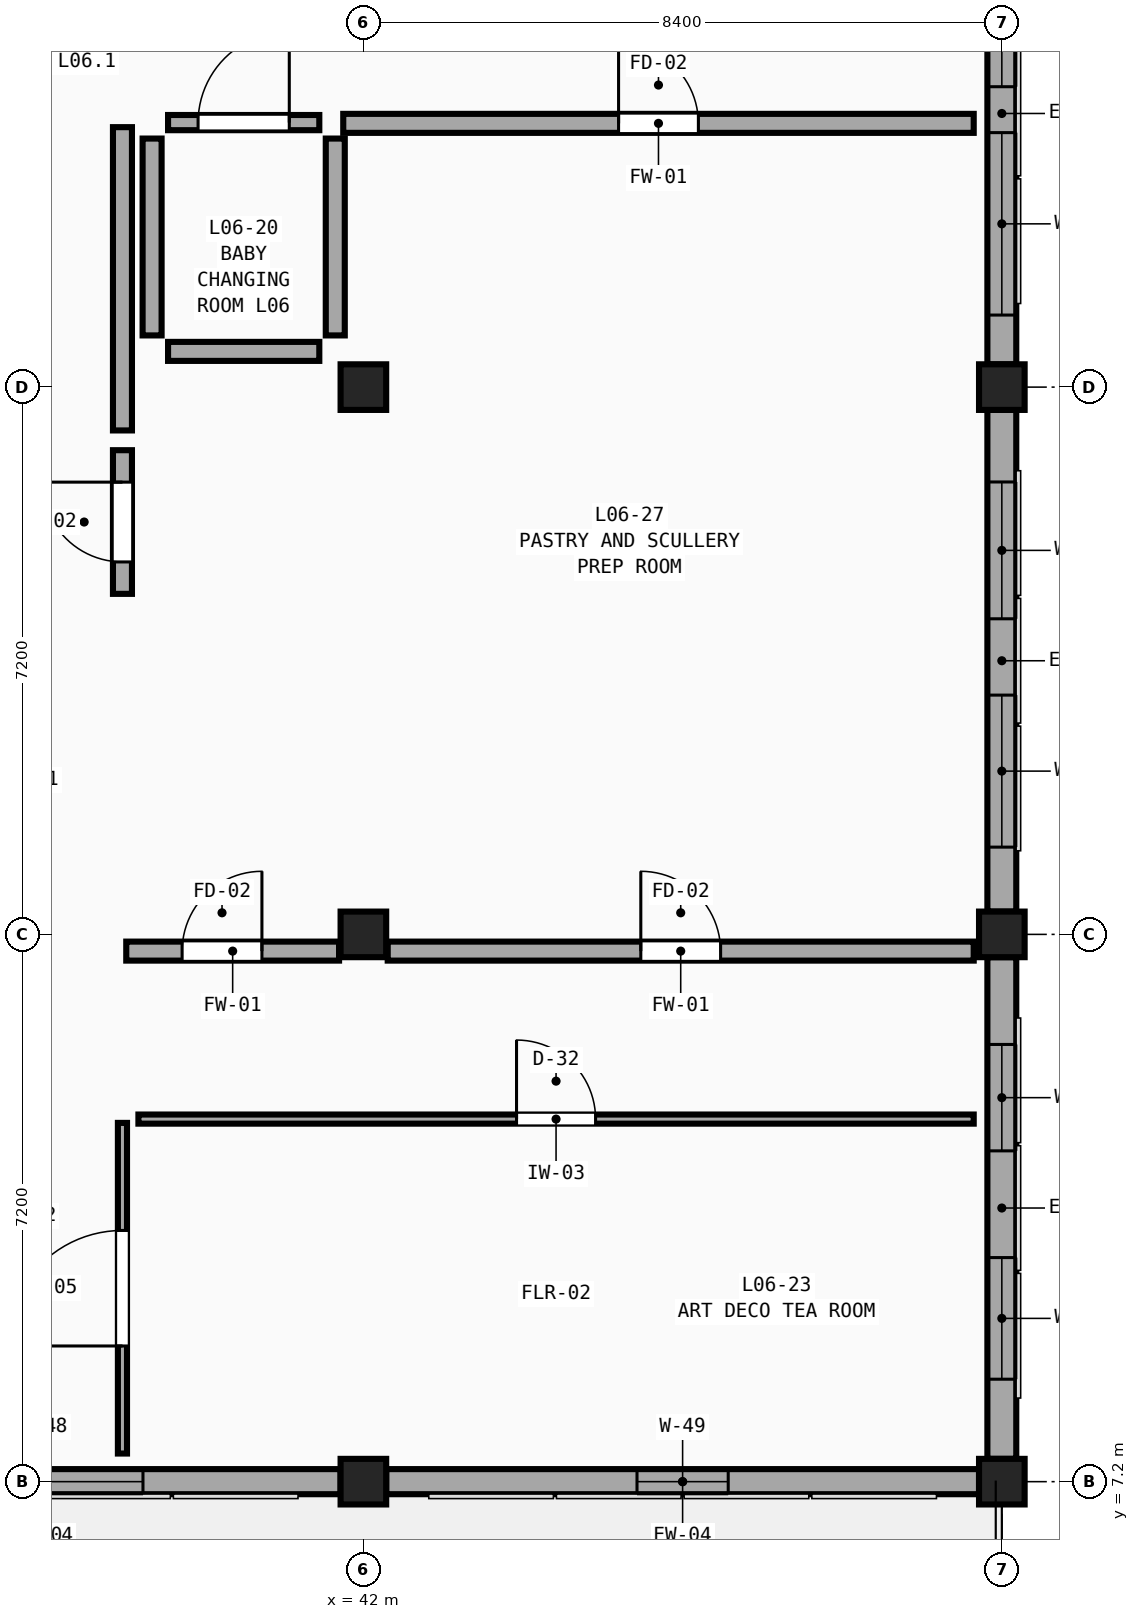
"""IFC4 building model, lengths in metres.
Left out: names, types, materials, properties, quantities, classifications, styles, units other than length and angle.
Written with IfcOpenShell. Run it as: python <this file> out.ifc"""

import sys

from ifc_helpers import new_model, si_unit, direction, frame, frame_2d, origin, origin_2d, place, context, subcontext, project, spatial, rectangle, extrude, element, fill, save


model = new_model("IFC4")
c1 = context("Model", 3, precision=1e-05, world=origin(), true_north=direction((0.0, 1.0)))
c2 = subcontext(c1, "Body", "Model", "MODEL_VIEW")
j1 = project(units=[si_unit("LENGTHUNIT", "METRE"), si_unit("PLANEANGLEUNIT", "RADIAN")], contexts=[c1])
p1 = place(None, origin())
s1 = spatial("IfcSite", under=j1, at=p1, CompositionType="ELEMENT")
p2 = place(p1, origin())
s2 = spatial("IfcBuilding", under=s1, at=p2, CompositionType="ELEMENT")
p3 = place(p2, frame((0.0, 0.0, 27.9)))
s3 = spatial("IfcBuildingStorey", under=s2, at=p3, CompositionType="ELEMENT", Elevation=27.9)
for number, where, z_axis, x_axis in (
    (1, (42.0, 7.2, 0.0), (0.0, 0.0, 1.0), (1.0, 0.0, 0.0)),
    (2, (42.0, 14.4, 0.0), (0.0, 0.0, 1.0), (1.0, 0.0, 0.0)),
    (3, (42.0, 21.6, 0.0), (0.0, 0.0, 1.0), (1.0, 0.0, 0.0)),
    (4, (50.4, 7.2, 0.0), (0.0, 0.0, 1.0), (1.0, 0.0, 0.0)),
    (5, (50.4, 14.4, 0.0), (0.0, 0.0, 1.0), (1.0, 0.0, 0.0)),
    (6, (50.4, 21.6, 0.0), (0.0, 0.0, 1.0), (1.0, 0.0, 0.0)),
):
    element("IfcColumn", number, at=place(p3, frame(where, z_axis=z_axis, x_axis=x_axis)), inside=s3, PredefinedType="COLUMN", context=c2, shape_type="SweptSolid", body=[
        extrude(rectangle(XDim=0.6, YDim=0.6, at=origin_2d()), origin(), (0.0, 0.0, 1.0), 4.2),
    ])
p4 = place(p3, frame((41.7, 7.2, 0.0), z_axis=(0.0, 0.0, 1.0), x_axis=(-1.0, 0.0, 0.0)))
e7 = element("IfcWall", 7, at=p4, inside=s3, PredefinedType="SOLIDWALL", context=c2, shape_type="SweptSolid", body=[
    extrude(rectangle(XDim=7.8, YDim=0.33, at=frame_2d((3.9, 0.0))), origin(), (0.0, 0.0, 1.0), 3.36),
])
p5 = place(p4, frame((2.6, 0.0, 0.75)))
e8 = element("IfcOpeningElement", 8, at=p5, cuts=e7, PredefinedType="OPENING", context=c2, shape_type="SweptSolid", body=[
    extrude(rectangle(XDim=2.6, YDim=2.41, at=frame_2d((1.3, 1.205))), frame((0.0, 0.185, 0.0), z_axis=(0.0, -1.0, 0.0), x_axis=(1.0, 0.0, 0.0)), (0.0, 0.0, 1.0), 0.37),
])
p6 = place(p3, frame((50.1, 7.2, 0.0), z_axis=(0.0, 0.0, 1.0), x_axis=(-1.0, 0.0, 0.0)))
e9 = element("IfcWall", 9, at=p6, inside=s3, PredefinedType="SOLIDWALL", context=c2, shape_type="SweptSolid", body=[
    extrude(rectangle(XDim=7.8, YDim=0.33, at=frame_2d((3.9, 0.0))), origin(), (0.0, 0.0, 1.0), 3.36),
])
p7 = place(p6, frame((3.3, 0.0, 0.75)))
e10 = element("IfcOpeningElement", 10, at=p7, cuts=e9, PredefinedType="OPENING", context=c2, shape_type="SweptSolid", body=[
    extrude(rectangle(XDim=1.2, YDim=2.41, at=frame_2d((0.6, 1.205))), frame((0.0, 0.185, 0.0), z_axis=(0.0, -1.0, 0.0), x_axis=(1.0, 0.0, 0.0)), (0.0, 0.0, 1.0), 0.37),
])
p8 = place(p3, frame((50.4, 14.1, 0.0), z_axis=(0.0, 0.0, 1.0), x_axis=(0.0, -1.0, 0.0)))
e11 = element("IfcWall", 11, at=p8, inside=s3, PredefinedType="SOLIDWALL", context=c2, shape_type="SweptSolid", body=[
    extrude(rectangle(XDim=6.6, YDim=0.38, at=frame_2d((3.3, 0.0))), origin(), (0.0, 0.0, 1.0), 3.36),
])
p9 = place(p8, frame((1.148, 0.0, 0.75)))
e12 = element("IfcOpeningElement", 12, at=p9, cuts=e11, PredefinedType="OPENING", context=c2, shape_type="SweptSolid", body=[
    extrude(rectangle(XDim=1.4, YDim=2.46, at=frame_2d((0.7, 1.23))), frame((0.0, 0.21, 0.0), z_axis=(0.0, -1.0, 0.0), x_axis=(1.0, 0.0, 0.0)), (0.0, 0.0, 1.0), 0.42),
])
p10 = place(p8, frame((3.952, 0.0, 0.75)))
e13 = element("IfcOpeningElement", 13, at=p10, cuts=e11, PredefinedType="OPENING", context=c2, shape_type="SweptSolid", body=[
    extrude(rectangle(XDim=1.6, YDim=2.46, at=frame_2d((0.8, 1.23))), frame((0.0, 0.21, 0.0), z_axis=(0.0, -1.0, 0.0), x_axis=(1.0, 0.0, 0.0)), (0.0, 0.0, 1.0), 0.42),
])
p11 = place(p3, frame((50.4, 21.3, 0.0), z_axis=(0.0, 0.0, 1.0), x_axis=(0.0, -1.0, 0.0)))
e14 = element("IfcWall", 14, at=p11, inside=s3, PredefinedType="SOLIDWALL", context=c2, shape_type="SweptSolid", body=[
    extrude(rectangle(XDim=6.6, YDim=0.38, at=frame_2d((3.3, 0.0))), origin(), (0.0, 0.0, 1.0), 3.36),
])
p12 = place(p11, frame((0.948, 0.0, 0.75)))
e15 = element("IfcOpeningElement", 15, at=p12, cuts=e14, PredefinedType="OPENING", context=c2, shape_type="SweptSolid", body=[
    extrude(rectangle(XDim=1.8, YDim=2.46, at=frame_2d((0.9, 1.23))), frame((0.0, 0.21, 0.0), z_axis=(0.0, -1.0, 0.0), x_axis=(1.0, 0.0, 0.0)), (0.0, 0.0, 1.0), 0.42),
])
p13 = place(p11, frame((3.752, 0.0, 0.75)))
e16 = element("IfcOpeningElement", 16, at=p13, cuts=e14, PredefinedType="OPENING", context=c2, shape_type="SweptSolid", body=[
    extrude(rectangle(XDim=2.0, YDim=2.46, at=frame_2d((1.0, 1.23))), frame((0.0, 0.21, 0.0), z_axis=(0.0, -1.0, 0.0), x_axis=(1.0, 0.0, 0.0)), (0.0, 0.0, 1.0), 0.42),
])
p14 = place(p3, frame((50.4, 28.5, 0.0), z_axis=(0.0, 0.0, 1.0), x_axis=(0.0, -1.0, 0.0)))
e17 = element("IfcWall", 17, at=p14, inside=s3, PredefinedType="SOLIDWALL", context=c2, shape_type="SweptSolid", body=[
    extrude(rectangle(XDim=6.6, YDim=0.38, at=frame_2d((3.3, 0.0))), origin(), (0.0, 0.0, 1.0), 3.36),
])
p15 = place(p14, frame((0.748, 0.0, 0.75)))
e18 = element("IfcOpeningElement", 18, at=p15, cuts=e17, PredefinedType="OPENING", context=c2, shape_type="SweptSolid", body=[
    extrude(rectangle(XDim=2.2, YDim=2.46, at=frame_2d((1.1, 1.23))), frame((0.0, 0.21, 0.0), z_axis=(0.0, -1.0, 0.0), x_axis=(1.0, 0.0, 0.0)), (0.0, 0.0, 1.0), 0.42),
])
p16 = place(p14, frame((3.552, 0.0, 0.75)))
e19 = element("IfcOpeningElement", 19, at=p16, cuts=e17, PredefinedType="OPENING", context=c2, shape_type="SweptSolid", body=[
    extrude(rectangle(XDim=2.4, YDim=2.46, at=frame_2d((1.2, 1.23))), frame((0.0, 0.21, 0.0), z_axis=(0.0, -1.0, 0.0), x_axis=(1.0, 0.0, 0.0)), (0.0, 0.0, 1.0), 0.42),
])
p17 = place(p3, frame((38.88, 14.18, 0.0), z_axis=(0.0, 0.0, 1.0), x_axis=(1.0, 0.0, 0.0)))
e20 = element("IfcWall", 20, at=p17, inside=s3, PredefinedType="SOLIDWALL", context=c2, shape_type="SweptSolid", body=[
    extrude(rectangle(XDim=2.8, YDim=0.25, at=frame_2d((1.4, 0.0))), origin(), (0.0, 0.0, 1.0), 3.46),
])
p18 = place(p17, frame((0.735, 0.0, 0.0)))
e21 = element("IfcOpeningElement", 21, at=p18, cuts=e20, PredefinedType="OPENING", context=c2, shape_type="SweptSolid", body=[
    extrude(rectangle(XDim=1.05, YDim=2.15, at=frame_2d((0.525, 1.075))), frame((0.0, 0.145, 0.0), z_axis=(0.0, -1.0, 0.0), x_axis=(1.0, 0.0, 0.0)), (0.0, 0.0, 1.0), 0.29),
])
p19 = place(p3, frame((42.32, 14.18, 0.0), z_axis=(0.0, 0.0, 1.0), x_axis=(1.0, 0.0, 0.0)))
e22 = element("IfcWall", 22, at=p19, inside=s3, PredefinedType="SOLIDWALL", context=c2, shape_type="SweptSolid", body=[
    extrude(rectangle(XDim=7.71, YDim=0.25, at=frame_2d((3.855, 0.0))), origin(), (0.0, 0.0, 1.0), 3.46),
])
p20 = place(p19, frame((3.33, 0.0, 0.0)))
e23 = element("IfcOpeningElement", 23, at=p20, cuts=e22, PredefinedType="OPENING", context=c2, shape_type="SweptSolid", body=[
    extrude(rectangle(XDim=1.05, YDim=2.15, at=frame_2d((0.525, 1.075))), frame((0.0, 0.145, 0.0), z_axis=(0.0, -1.0, 0.0), x_axis=(1.0, 0.0, 0.0)), (0.0, 0.0, 1.0), 0.29),
])
p21 = place(p3, frame((39.04, 11.97, 0.0), z_axis=(0.0, 0.0, 1.0), x_axis=(1.0, 0.0, 0.0)))
e24 = element("IfcWall", 24, at=p21, inside=s3, PredefinedType="PARTITIONING", context=c2, shape_type="SweptSolid", body=[
    extrude(rectangle(XDim=10.99, YDim=0.12, at=frame_2d((5.495, 0.0))), origin(), (0.0, 0.0, 1.0), 3.91),
])
p22 = place(p21, frame((4.975, 0.0, 0.0)))
e25 = element("IfcOpeningElement", 25, at=p22, cuts=e24, PredefinedType="OPENING", context=c2, shape_type="SweptSolid", body=[
    extrude(rectangle(XDim=1.04, YDim=2.45, at=frame_2d((0.52, 1.225))), frame((0.0, 0.08, 0.0), z_axis=(0.0, -1.0, 0.0), x_axis=(1.0, 0.0, 0.0)), (0.0, 0.0, 1.0), 0.16),
])
p23 = place(p3, frame((41.735, 25.07, 0.0), z_axis=(0.0, 0.0, 1.0), x_axis=(1.0, 0.0, 0.0)))
e26 = element("IfcWall", 26, at=p23, inside=s3, PredefinedType="SOLIDWALL", context=c2, shape_type="SweptSolid", body=[
    extrude(rectangle(XDim=8.295, YDim=0.25, at=frame_2d((4.147, 0.0))), origin(), (0.0, 0.0, 1.0), 3.91),
])
p24 = place(p23, frame((3.623, 0.0, 0.0)))
e27 = element("IfcOpeningElement", 27, at=p24, cuts=e26, PredefinedType="OPENING", context=c2, shape_type="SweptSolid", body=[
    extrude(rectangle(XDim=1.05, YDim=2.15, at=frame_2d((0.525, 1.075))), frame((0.0, 0.145, 0.0), z_axis=(0.0, -1.0, 0.0), x_axis=(1.0, 0.0, 0.0)), (0.0, 0.0, 1.0), 0.29),
])
p25 = place(p3, frame((38.83, 7.57, 0.0), z_axis=(0.0, 0.0, 1.0), x_axis=(0.0, 1.0, 0.0)))
e28 = element("IfcWall", 28, at=p25, inside=s3, PredefinedType="PARTITIONING", context=c2, shape_type="SweptSolid", body=[
    extrude(rectangle(XDim=4.35, YDim=0.12, at=frame_2d((2.175, 0.0))), origin(), (0.0, 0.0, 1.0), 3.91),
])
p26 = place(p25, frame((1.415, 0.0, 0.0)))
e29 = element("IfcOpeningElement", 29, at=p26, cuts=e28, PredefinedType="OPENING", context=c2, shape_type="SweptSolid", body=[
    extrude(rectangle(XDim=1.52, YDim=2.05, at=frame_2d((0.76, 1.025))), frame((0.0, 0.08, 0.0), z_axis=(0.0, -1.0, 0.0), x_axis=(1.0, 0.0, 0.0)), (0.0, 0.0, 1.0), 0.16),
])
p27 = place(p3, frame((38.83, 21.03, 0.0), z_axis=(0.0, 0.0, 1.0), x_axis=(0.0, 1.0, 0.0)))
e30 = element("IfcWall", 30, at=p27, inside=s3, PredefinedType="SOLIDWALL", context=c2, shape_type="SweptSolid", body=[
    extrude(rectangle(XDim=3.99, YDim=0.25, at=frame_2d((1.995, 0.0))), origin(), (0.0, 0.0, 1.0), 3.91),
])
p28 = place(p3, frame((39.43, 25.08, 0.0), z_axis=(0.0, 0.0, 1.0), x_axis=(1.0, 0.0, 0.0)))
e31 = element("IfcWall", 31, at=p28, inside=s3, PredefinedType="PLUMBINGWALL", context=c2, shape_type="SweptSolid", body=[
    extrude(rectangle(XDim=1.99, YDim=0.2, at=frame_2d((0.995, 0.0))), origin(), (0.0, 0.0, 1.0), 3.91),
])
p29 = place(p28, frame((0.395, 0.0, 0.0)))
e32 = element("IfcOpeningElement", 32, at=p29, cuts=e31, PredefinedType="OPENING", context=c2, shape_type="SweptSolid", body=[
    extrude(rectangle(XDim=1.2, YDim=2.37, at=frame_2d((0.6, 1.185))), frame((0.0, 0.12, 0.0), z_axis=(0.0, -1.0, 0.0), x_axis=(1.0, 0.0, 0.0)), (0.0, 0.0, 1.0), 0.24),
])
p30 = place(p3, frame((38.83, 18.88, 0.0), z_axis=(0.0, 0.0, 1.0), x_axis=(0.0, 1.0, 0.0)))
e33 = element("IfcWall", 33, at=p30, inside=s3, PredefinedType="SOLIDWALL", context=c2, shape_type="SweptSolid", body=[
    extrude(rectangle(XDim=1.89, YDim=0.25, at=frame_2d((0.945, 0.0))), origin(), (0.0, 0.0, 1.0), 3.91),
])
p31 = place(p30, frame((0.42, 0.0, 0.0)))
e34 = element("IfcOpeningElement", 34, at=p31, cuts=e33, PredefinedType="OPENING", context=c2, shape_type="SweptSolid", body=[
    extrude(rectangle(XDim=1.05, YDim=2.15, at=frame_2d((0.525, 1.075))), frame((0.0, 0.145, 0.0), z_axis=(0.0, -1.0, 0.0), x_axis=(1.0, 0.0, 0.0)), (0.0, 0.0, 1.0), 0.29),
])
p32 = place(p3, frame((41.63, 22.28, 0.0), z_axis=(0.0, 0.0, 1.0), x_axis=(0.0, 1.0, 0.0)))
e35 = element("IfcWall", 35, at=p32, inside=s3, PredefinedType="SOLIDWALL", context=c2, shape_type="SweptSolid", body=[
    extrude(rectangle(XDim=2.59, YDim=0.25, at=frame_2d((1.295, 0.0))), origin(), (0.0, 0.0, 1.0), 3.46),
])
p33 = place(p3, frame((39.22, 22.28, 0.0), z_axis=(0.0, 0.0, 1.0), x_axis=(0.0, 1.0, 0.0)))
e36 = element("IfcWall", 36, at=p33, inside=s3, PredefinedType="SOLIDWALL", context=c2, shape_type="SweptSolid", body=[
    extrude(rectangle(XDim=2.59, YDim=0.25, at=frame_2d((1.295, 0.0))), origin(), (0.0, 0.0, 1.0), 3.91),
])
p34 = place(p3, frame((39.43, 22.07, 0.0), z_axis=(0.0, 0.0, 1.0), x_axis=(1.0, 0.0, 0.0)))
e37 = element("IfcWall", 37, at=p34, inside=s3, PredefinedType="SOLIDWALL", context=c2, shape_type="SweptSolid", body=[
    extrude(rectangle(XDim=1.99, YDim=0.25, at=frame_2d((0.995, 0.0))), origin(), (0.0, 0.0, 1.0), 3.46),
])
p35 = place(p5, origin())
e38 = element("IfcWindow", 38, at=p35, inside=s3, PartitioningType="TRIPLE_PANEL_VERTICAL", PredefinedType="WINDOW", context=c2, shape_type="SweptSolid", body=[
    extrude(rectangle(XDim=2.6, YDim=2.41, at=frame_2d((1.3, 1.205))), frame((0.0, 0.03, 0.0), z_axis=(0.0, -1.0, 0.0), x_axis=(1.0, 0.0, 0.0)), (0.0, 0.0, 1.0), 0.06),
])
fill(e8, e38)
p36 = place(p7, origin())
e39 = element("IfcWindow", 39, at=p36, inside=s3, PartitioningType="SINGLE_PANEL", PredefinedType="WINDOW", context=c2, shape_type="SweptSolid", body=[
    extrude(rectangle(XDim=1.2, YDim=2.41, at=frame_2d((0.6, 1.205))), frame((0.0, 0.03, 0.0), z_axis=(0.0, -1.0, 0.0), x_axis=(1.0, 0.0, 0.0)), (0.0, 0.0, 1.0), 0.06),
])
fill(e10, e39)
p37 = place(p9, origin())
e40 = element("IfcWindow", 40, at=p37, inside=s3, PartitioningType="DOUBLE_PANEL_VERTICAL", PredefinedType="WINDOW", context=c2, shape_type="SweptSolid", body=[
    extrude(rectangle(XDim=1.4, YDim=2.46, at=frame_2d((0.7, 1.23))), frame((0.0, 0.03, 0.0), z_axis=(0.0, -1.0, 0.0), x_axis=(1.0, 0.0, 0.0)), (0.0, 0.0, 1.0), 0.06),
])
fill(e12, e40)
p38 = place(p10, origin())
e41 = element("IfcWindow", 41, at=p38, inside=s3, PartitioningType="DOUBLE_PANEL_VERTICAL", PredefinedType="WINDOW", context=c2, shape_type="SweptSolid", body=[
    extrude(rectangle(XDim=1.6, YDim=2.46, at=frame_2d((0.8, 1.23))), frame((0.0, 0.03, 0.0), z_axis=(0.0, -1.0, 0.0), x_axis=(1.0, 0.0, 0.0)), (0.0, 0.0, 1.0), 0.06),
])
fill(e13, e41)
p39 = place(p12, origin())
e42 = element("IfcWindow", 42, at=p39, inside=s3, PartitioningType="DOUBLE_PANEL_VERTICAL", PredefinedType="WINDOW", context=c2, shape_type="SweptSolid", body=[
    extrude(rectangle(XDim=1.8, YDim=2.46, at=frame_2d((0.9, 1.23))), frame((0.0, 0.03, 0.0), z_axis=(0.0, -1.0, 0.0), x_axis=(1.0, 0.0, 0.0)), (0.0, 0.0, 1.0), 0.06),
])
fill(e15, e42)
p40 = place(p13, origin())
e43 = element("IfcWindow", 43, at=p40, inside=s3, PartitioningType="TRIPLE_PANEL_VERTICAL", PredefinedType="WINDOW", context=c2, shape_type="SweptSolid", body=[
    extrude(rectangle(XDim=2.0, YDim=2.46, at=frame_2d((1.0, 1.23))), frame((0.0, 0.03, 0.0), z_axis=(0.0, -1.0, 0.0), x_axis=(1.0, 0.0, 0.0)), (0.0, 0.0, 1.0), 0.06),
])
fill(e16, e43)
p41 = place(p15, origin())
e44 = element("IfcWindow", 44, at=p41, inside=s3, PartitioningType="TRIPLE_PANEL_VERTICAL", PredefinedType="WINDOW", context=c2, shape_type="SweptSolid", body=[
    extrude(rectangle(XDim=2.2, YDim=2.46, at=frame_2d((1.1, 1.23))), frame((0.0, 0.03, 0.0), z_axis=(0.0, -1.0, 0.0), x_axis=(1.0, 0.0, 0.0)), (0.0, 0.0, 1.0), 0.06),
])
fill(e18, e44)
p42 = place(p16, origin())
e45 = element("IfcWindow", 45, at=p42, inside=s3, PartitioningType="TRIPLE_PANEL_VERTICAL", PredefinedType="WINDOW", context=c2, shape_type="SweptSolid", body=[
    extrude(rectangle(XDim=2.4, YDim=2.46, at=frame_2d((1.2, 1.23))), frame((0.0, 0.03, 0.0), z_axis=(0.0, -1.0, 0.0), x_axis=(1.0, 0.0, 0.0)), (0.0, 0.0, 1.0), 0.06),
])
fill(e19, e45)
p43 = place(p18, origin())
e46 = element("IfcDoor", 46, at=p43, inside=s3, OperationType="SINGLE_SWING_RIGHT", PredefinedType="DOOR", context=c2, shape_type="SweptSolid", body=[
    extrude(rectangle(XDim=1.05, YDim=2.15, at=frame_2d((0.525, 1.075))), frame((0.0, 0.025, 0.0), z_axis=(0.0, -1.0, 0.0), x_axis=(1.0, 0.0, 0.0)), (0.0, 0.0, 1.0), 0.05),
])
fill(e21, e46)
p44 = place(p20, origin())
e47 = element("IfcDoor", 47, at=p44, inside=s3, OperationType="SINGLE_SWING_LEFT", PredefinedType="DOOR", context=c2, shape_type="SweptSolid", body=[
    extrude(rectangle(XDim=1.05, YDim=2.15, at=frame_2d((0.525, 1.075))), frame((0.0, 0.025, 0.0), z_axis=(0.0, -1.0, 0.0), x_axis=(1.0, 0.0, 0.0)), (0.0, 0.0, 1.0), 0.05),
])
fill(e23, e47)
p45 = place(p22, origin())
e48 = element("IfcDoor", 48, at=p45, inside=s3, OperationType="SINGLE_SWING_LEFT", PredefinedType="DOOR", context=c2, shape_type="SweptSolid", body=[
    extrude(rectangle(XDim=1.04, YDim=2.45, at=frame_2d((0.52, 1.225))), frame((0.0, 0.025, 0.0), z_axis=(0.0, -1.0, 0.0), x_axis=(1.0, 0.0, 0.0)), (0.0, 0.0, 1.0), 0.05),
])
fill(e25, e48)
p46 = place(p24, origin())
e49 = element("IfcDoor", 49, at=p46, inside=s3, OperationType="SINGLE_SWING_LEFT", PredefinedType="DOOR", context=c2, shape_type="SweptSolid", body=[
    extrude(rectangle(XDim=1.05, YDim=2.15, at=frame_2d((0.525, 1.075))), frame((0.0, 0.025, 0.0), z_axis=(0.0, -1.0, 0.0), x_axis=(1.0, 0.0, 0.0)), (0.0, 0.0, 1.0), 0.05),
])
fill(e27, e49)
p47 = place(p26, origin())
e50 = element("IfcDoor", 50, at=p47, inside=s3, OperationType="SINGLE_SWING_LEFT", PredefinedType="DOOR", context=c2, shape_type="SweptSolid", body=[
    extrude(rectangle(XDim=1.52, YDim=2.05, at=frame_2d((0.76, 1.025))), frame((0.0, 0.025, 0.0), z_axis=(0.0, -1.0, 0.0), x_axis=(1.0, 0.0, 0.0)), (0.0, 0.0, 1.0), 0.05),
])
fill(e29, e50)
p48 = place(p29, origin())
e51 = element("IfcDoor", 51, at=p48, inside=s3, OperationType="SINGLE_SWING_RIGHT", PredefinedType="DOOR", context=c2, shape_type="SweptSolid", body=[
    extrude(rectangle(XDim=1.2, YDim=2.37, at=frame_2d((0.6, 1.185))), frame((0.0, 0.025, 0.0), z_axis=(0.0, -1.0, 0.0), x_axis=(1.0, 0.0, 0.0)), (0.0, 0.0, 1.0), 0.05),
])
fill(e32, e51)
p49 = place(p31, origin())
e52 = element("IfcDoor", 52, at=p49, inside=s3, OperationType="SINGLE_SWING_RIGHT", PredefinedType="DOOR", context=c2, shape_type="SweptSolid", body=[
    extrude(rectangle(XDim=1.05, YDim=2.15, at=frame_2d((0.525, 1.075))), frame((0.0, 0.025, 0.0), z_axis=(0.0, -1.0, 0.0), x_axis=(1.0, 0.0, 0.0)), (0.0, 0.0, 1.0), 0.05),
])
fill(e34, e52)
save(model, sys.argv[1])
